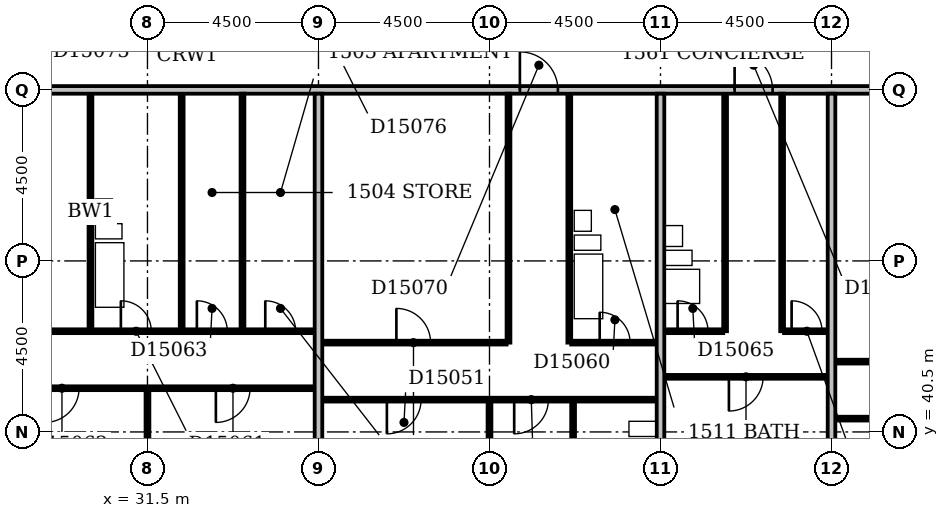
"""IFC4 building model, lengths in metres.
Left out: names, types, materials, properties, quantities, classifications, styles, units other than length and angle.
Written with IfcOpenShell. Run it as: python <this file> out.ifc"""

import sys

from ifc_helpers import new_model, si_unit, direction, frame, frame_2d, origin, place, context, subcontext, project, spatial, rectangle, extrude, element, fill, save


model = new_model("IFC4")
c1 = context("Model", 3, precision=1e-05, world=origin(), true_north=direction((0.0, 1.0)))
c2 = subcontext(c1, "Body", "Model", "MODEL_VIEW")
j1 = project(units=[si_unit("LENGTHUNIT", "METRE"), si_unit("PLANEANGLEUNIT", "RADIAN")], contexts=[c1])
p1 = place(None, origin())
s1 = spatial("IfcSite", under=j1, at=p1, CompositionType="ELEMENT")
p2 = place(p1, origin())
s2 = spatial("IfcBuilding", under=s1, at=p2, CompositionType="ELEMENT")
p3 = place(p2, frame((0.0, 0.0, 65.0)))
s3 = spatial("IfcBuildingStorey", under=s2, at=p3, CompositionType="ELEMENT", Elevation=65.0)
p4 = place(p3, frame((31.5, 36.6, 0.0), z_axis=(0.0, 0.0, 1.0), x_axis=(0.0, 1.0, 0.0)))
e1 = element("IfcWall", 1, at=p4, inside=s3, PredefinedType="PARTITIONING", context=c2, shape_type="SweptSolid", body=[
    extrude(rectangle(XDim=5.0, YDim=0.1, at=frame_2d((2.5, 0.0))), origin(), (0.0, 0.0, 1.0), 3.3),
])
p5 = place(p3, frame((36.0, 36.6, 0.0), z_axis=(0.0, 0.0, 1.0), x_axis=(0.0, 1.0, 0.0)))
e2 = element("IfcWall", 2, at=p5, inside=s3, PredefinedType="PARTITIONING", context=c2, shape_type="SweptSolid", body=[
    extrude(rectangle(XDim=12.8, YDim=0.2, at=frame_2d((6.4, 0.0))), origin(), (0.0, 0.0, 1.0), 2.4),
])
p6 = place(p3, frame((40.5, 36.6, 0.0), z_axis=(0.0, 0.0, 1.0), x_axis=(0.0, 1.0, 0.0)))
e3 = element("IfcWall", 3, at=p6, inside=s3, PredefinedType="PARTITIONING", context=c2, shape_type="SweptSolid", body=[
    extrude(rectangle(XDim=4.7, YDim=0.1, at=frame_2d((2.35, 0.0))), origin(), (0.0, 0.0, 1.0), 3.3),
])
p7 = place(p3, frame((45.0, 36.6, 0.0), z_axis=(0.0, 0.0, 1.0), x_axis=(0.0, 1.0, 0.0)))
e4 = element("IfcWall", 4, at=p7, inside=s3, PredefinedType="PARTITIONING", context=c2, shape_type="SweptSolid", body=[
    extrude(rectangle(XDim=12.8, YDim=0.2, at=frame_2d((6.4, 0.0))), origin(), (0.0, 0.0, 1.0), 2.6),
])
p8 = place(p3, frame((49.5, 36.6, 0.0), z_axis=(0.0, 0.0, 1.0), x_axis=(0.0, 1.0, 0.0)))
e5 = element("IfcWall", 5, at=p8, inside=s3, PredefinedType="PARTITIONING", context=c2, shape_type="SweptSolid", body=[
    extrude(rectangle(XDim=12.8, YDim=0.2, at=frame_2d((6.4, 0.0))), origin(), (0.0, 0.0, 1.0), 3.3),
])
p9 = place(p3, frame((42.7, 38.45, 0.0), z_axis=(0.0, 0.0, 1.0), x_axis=(0.0, 1.0, 0.0)))
e6 = element("IfcWall", 6, at=p9, inside=s3, PredefinedType="PLUMBINGWALL", context=c2, shape_type="SweptSolid", body=[
    extrude(rectangle(XDim=2.85, YDim=0.1, at=frame_2d((1.425, 0.0))), origin(), (0.0, 0.0, 1.0), 3.3),
])
p10 = place(p9, frame((1.05, 0.0, 0.0)))
e7 = element("IfcOpeningElement", 7, at=p10, cuts=e6, PredefinedType="OPENING", context=c2, shape_type="SweptSolid", body=[
    extrude(rectangle(XDim=0.8, YDim=2.1, at=frame_2d((0.4, 1.05))), frame((0.0, 0.062, 0.0), z_axis=(0.0, -1.0, 0.0), x_axis=(1.0, 0.0, 0.0)), (0.0, 0.0, 1.0), 0.124),
])
p11 = place(p3, frame((49.6, 40.85, 0.0), z_axis=(0.0, 0.0, 1.0), x_axis=(1.0, 0.0, 0.0)))
e8 = element("IfcWall", 8, at=p11, inside=s3, PredefinedType="PARTITIONING", context=c2, shape_type="SweptSolid", body=[
    extrude(rectangle(XDim=8.8, YDim=0.1, at=frame_2d((4.4, 0.0))), origin(), (0.0, 0.0, 1.0), 3.3),
])
p12 = place(p11, frame((1.7, 0.0, 0.0)))
e9 = element("IfcOpeningElement", 9, at=p12, cuts=e8, PredefinedType="OPENING", context=c2, shape_type="SweptSolid", body=[
    extrude(rectangle(XDim=0.9, YDim=2.1, at=frame_2d((0.45, 1.05))), frame((0.0, 0.062, 0.0), z_axis=(0.0, -1.0, 0.0), x_axis=(1.0, 0.0, 0.0)), (0.0, 0.0, 1.0), 0.124),
])
p13 = place(p11, frame((5.05, 0.0, 0.0)))
e10 = element("IfcOpeningElement", 10, at=p13, cuts=e8, PredefinedType="OPENING", context=c2, shape_type="SweptSolid", body=[
    extrude(rectangle(XDim=0.9, YDim=2.1, at=frame_2d((0.45, 1.05))), frame((0.0, 0.062, 0.0), z_axis=(0.0, -1.0, 0.0), x_axis=(1.0, 0.0, 0.0)), (0.0, 0.0, 1.0), 0.124),
])
p14 = place(p3, frame((36.1, 41.35, 0.0), z_axis=(0.0, 0.0, 1.0), x_axis=(1.0, 0.0, 0.0)))
e11 = element("IfcWall", 11, at=p14, inside=s3, PredefinedType="PARTITIONING", context=c2, shape_type="SweptSolid", body=[
    extrude(rectangle(XDim=8.8, YDim=0.1, at=frame_2d((4.4, 0.0))), origin(), (0.0, 0.0, 1.0), 3.3),
])
p15 = place(p14, frame((1.7, 0.0, 0.0)))
e12 = element("IfcOpeningElement", 12, at=p15, cuts=e11, PredefinedType="OPENING", context=c2, shape_type="SweptSolid", body=[
    extrude(rectangle(XDim=0.9, YDim=2.1, at=frame_2d((0.45, 1.05))), frame((0.0, 0.062, 0.0), z_axis=(0.0, -1.0, 0.0), x_axis=(1.0, 0.0, 0.0)), (0.0, 0.0, 1.0), 0.124),
])
p16 = place(p14, frame((5.05, 0.0, 0.0)))
e13 = element("IfcOpeningElement", 13, at=p16, cuts=e11, PredefinedType="OPENING", context=c2, shape_type="SweptSolid", body=[
    extrude(rectangle(XDim=0.9, YDim=2.1, at=frame_2d((0.45, 1.05))), frame((0.0, 0.062, 0.0), z_axis=(0.0, -1.0, 0.0), x_axis=(1.0, 0.0, 0.0)), (0.0, 0.0, 1.0), 0.124),
])
p17 = place(p3, frame((22.6, 41.65, 0.0), z_axis=(0.0, 0.0, 1.0), x_axis=(1.0, 0.0, 0.0)))
e14 = element("IfcWall", 14, at=p17, inside=s3, PredefinedType="PARTITIONING", context=c2, shape_type="SweptSolid", body=[
    extrude(rectangle(XDim=13.3, YDim=0.1, at=frame_2d((6.65, 0.0))), origin(), (0.0, 0.0, 1.0), 3.3),
])
p18 = place(p17, frame((1.7, 0.0, 0.0)))
e15 = element("IfcOpeningElement", 15, at=p18, cuts=e14, PredefinedType="OPENING", context=c2, shape_type="SweptSolid", body=[
    extrude(rectangle(XDim=0.9, YDim=2.1, at=frame_2d((0.45, 1.05))), frame((0.0, 0.062, 0.0), z_axis=(0.0, -1.0, 0.0), x_axis=(1.0, 0.0, 0.0)), (0.0, 0.0, 1.0), 0.124),
])
p19 = place(p17, frame((6.2, 0.0, 0.0)))
e16 = element("IfcOpeningElement", 16, at=p19, cuts=e14, PredefinedType="OPENING", context=c2, shape_type="SweptSolid", body=[
    extrude(rectangle(XDim=0.9, YDim=2.1, at=frame_2d((0.45, 1.05))), frame((0.0, 0.062, 0.0), z_axis=(0.0, -1.0, 0.0), x_axis=(1.0, 0.0, 0.0)), (0.0, 0.0, 1.0), 0.124),
])
p20 = place(p17, frame((10.7, 0.0, 0.0)))
e17 = element("IfcOpeningElement", 17, at=p20, cuts=e14, PredefinedType="OPENING", context=c2, shape_type="SweptSolid", body=[
    extrude(rectangle(XDim=0.9, YDim=2.1, at=frame_2d((0.45, 1.05))), frame((0.0, 0.062, 0.0), z_axis=(0.0, -1.0, 0.0), x_axis=(1.0, 0.0, 0.0)), (0.0, 0.0, 1.0), 0.124),
])
p21 = place(p3, frame((45.1, 41.95, 0.0), z_axis=(0.0, 0.0, 1.0), x_axis=(1.0, 0.0, 0.0)))
e18 = element("IfcWall", 18, at=p21, inside=s3, PredefinedType="PARTITIONING", context=c2, shape_type="SweptSolid", body=[
    extrude(rectangle(XDim=4.3, YDim=0.1, at=frame_2d((2.15, 0.0))), origin(), (0.0, 0.0, 1.0), 3.3),
])
p22 = place(p21, frame((1.7, 0.0, 0.0)))
e19 = element("IfcOpeningElement", 19, at=p22, cuts=e18, PredefinedType="OPENING", context=c2, shape_type="SweptSolid", body=[
    extrude(rectangle(XDim=0.9, YDim=2.1, at=frame_2d((0.45, 1.05))), frame((0.0, 0.062, 0.0), z_axis=(0.0, -1.0, 0.0), x_axis=(1.0, 0.0, 0.0)), (0.0, 0.0, 1.0), 0.124),
])
p23 = place(p3, frame((49.6, 42.35, 0.0), z_axis=(0.0, 0.0, 1.0), x_axis=(1.0, 0.0, 0.0)))
e20 = element("IfcWall", 20, at=p23, inside=s3, PredefinedType="PARTITIONING", context=c2, shape_type="SweptSolid", body=[
    extrude(rectangle(XDim=4.85, YDim=0.1, at=frame_2d((2.425, 0.0))), origin(), (0.0, 0.0, 1.0), 3.3),
])
p24 = place(p23, frame((1.95, 0.0, 0.0)))
e21 = element("IfcOpeningElement", 21, at=p24, cuts=e20, PredefinedType="OPENING", context=c2, shape_type="SweptSolid", body=[
    extrude(rectangle(XDim=0.9, YDim=2.1, at=frame_2d((0.45, 1.05))), frame((0.0, 0.062, 0.0), z_axis=(0.0, -1.0, 0.0), x_axis=(1.0, 0.0, 0.0)), (0.0, 0.0, 1.0), 0.124),
])
p25 = place(p3, frame((36.1, 42.85, 0.0), z_axis=(0.0, 0.0, 1.0), x_axis=(1.0, 0.0, 0.0)))
e22 = element("IfcWall", 22, at=p25, inside=s3, PredefinedType="PARTITIONING", context=c2, shape_type="SweptSolid", body=[
    extrude(rectangle(XDim=4.85, YDim=0.1, at=frame_2d((2.425, 0.0))), origin(), (0.0, 0.0, 1.0), 3.3),
])
p26 = place(p25, frame((1.95, 0.0, 0.0)))
e23 = element("IfcOpeningElement", 23, at=p26, cuts=e22, PredefinedType="OPENING", context=c2, shape_type="SweptSolid", body=[
    extrude(rectangle(XDim=0.9, YDim=2.1, at=frame_2d((0.45, 1.05))), frame((0.0, 0.062, 0.0), z_axis=(0.0, -1.0, 0.0), x_axis=(1.0, 0.0, 0.0)), (0.0, 0.0, 1.0), 0.124),
])
p27 = place(p3, frame((41.0, 42.85, 0.0), z_axis=(0.0, 0.0, 1.0), x_axis=(0.0, 1.0, 0.0)))
e24 = element("IfcWall", 24, at=p27, inside=s3, PredefinedType="PARTITIONING", context=c2, shape_type="SweptSolid", body=[
    extrude(rectangle(XDim=6.55, YDim=0.1, at=frame_2d((3.275, 0.0))), origin(), (0.0, 0.0, 1.0), 3.3),
])
p28 = place(p3, frame((42.6, 42.85, 0.0), z_axis=(0.0, 0.0, 1.0), x_axis=(0.0, 1.0, 0.0)))
e25 = element("IfcWall", 25, at=p28, inside=s3, PredefinedType="PLUMBINGWALL", context=c2, shape_type="SweptSolid", body=[
    extrude(rectangle(XDim=6.55, YDim=0.1, at=frame_2d((3.275, 0.0))), origin(), (0.0, 0.0, 1.0), 3.3),
])
p29 = place(p3, frame((42.65, 42.85, 0.0), z_axis=(0.0, 0.0, 1.0), x_axis=(1.0, 0.0, 0.0)))
e26 = element("IfcWall", 26, at=p29, inside=s3, PredefinedType="PARTITIONING", context=c2, shape_type="SweptSolid", body=[
    extrude(rectangle(XDim=2.25, YDim=0.1, at=frame_2d((1.125, 0.0))), origin(), (0.0, 0.0, 1.0), 3.3),
])
p30 = place(p29, frame((0.75, 0.0, 0.0)))
e27 = element("IfcOpeningElement", 27, at=p30, cuts=e26, PredefinedType="OPENING", context=c2, shape_type="SweptSolid", body=[
    extrude(rectangle(XDim=0.8, YDim=2.1, at=frame_2d((0.4, 1.05))), frame((0.0, 0.062, 0.0), z_axis=(0.0, -1.0, 0.0), x_axis=(1.0, 0.0, 0.0)), (0.0, 0.0, 1.0), 0.124),
])
p31 = place(p3, frame((24.15, 43.15, 0.0), z_axis=(0.0, 0.0, 1.0), x_axis=(1.0, 0.0, 0.0)))
e28 = element("IfcWall", 28, at=p31, inside=s3, PredefinedType="PARTITIONING", context=c2, shape_type="SweptSolid", body=[
    extrude(rectangle(XDim=11.75, YDim=0.1, at=frame_2d((5.875, 0.0))), origin(), (0.0, 0.0, 1.0), 3.3),
])
p32 = place(p31, frame((6.65, 0.0, 0.0)))
e29 = element("IfcOpeningElement", 29, at=p32, cuts=e28, PredefinedType="OPENING", context=c2, shape_type="SweptSolid", body=[
    extrude(rectangle(XDim=0.8, YDim=2.1, at=frame_2d((0.4, 1.05))), frame((0.0, 0.062, 0.0), z_axis=(0.0, -1.0, 0.0), x_axis=(1.0, 0.0, 0.0)), (0.0, 0.0, 1.0), 0.124),
])
p33 = place(p31, frame((2.45, 0.0, 0.0)))
e30 = element("IfcOpeningElement", 30, at=p33, cuts=e28, PredefinedType="OPENING", context=c2, shape_type="SweptSolid", body=[
    extrude(rectangle(XDim=0.9, YDim=2.1, at=frame_2d((0.45, 1.05))), frame((0.0, 0.062, 0.0), z_axis=(0.0, -1.0, 0.0), x_axis=(1.0, 0.0, 0.0)), (0.0, 0.0, 1.0), 0.124),
])
p34 = place(p31, frame((8.65, 0.0, 0.0)))
e31 = element("IfcOpeningElement", 31, at=p34, cuts=e28, PredefinedType="OPENING", context=c2, shape_type="SweptSolid", body=[
    extrude(rectangle(XDim=0.8, YDim=2.1, at=frame_2d((0.4, 1.05))), frame((0.0, 0.062, 0.0), z_axis=(0.0, -1.0, 0.0), x_axis=(1.0, 0.0, 0.0)), (0.0, 0.0, 1.0), 0.124),
])
p35 = place(p31, frame((10.45, 0.0, 0.0)))
e32 = element("IfcOpeningElement", 32, at=p35, cuts=e28, PredefinedType="OPENING", context=c2, shape_type="SweptSolid", body=[
    extrude(rectangle(XDim=0.8, YDim=2.1, at=frame_2d((0.4, 1.05))), frame((0.0, 0.062, 0.0), z_axis=(0.0, -1.0, 0.0), x_axis=(1.0, 0.0, 0.0)), (0.0, 0.0, 1.0), 0.124),
])
p36 = place(p3, frame((45.1, 43.15, 0.0), z_axis=(0.0, 0.0, 1.0), x_axis=(1.0, 0.0, 0.0)))
e33 = element("IfcWall", 33, at=p36, inside=s3, PredefinedType="PARTITIONING", context=c2, shape_type="SweptSolid", body=[
    extrude(rectangle(XDim=1.55, YDim=0.1, at=frame_2d((0.775, 0.0))), origin(), (0.0, 0.0, 1.0), 3.3),
])
p37 = place(p36, frame((0.35, 0.0, 0.0)))
e34 = element("IfcOpeningElement", 34, at=p37, cuts=e33, PredefinedType="OPENING", context=c2, shape_type="SweptSolid", body=[
    extrude(rectangle(XDim=0.8, YDim=2.1, at=frame_2d((0.4, 1.05))), frame((0.0, 0.062, 0.0), z_axis=(0.0, -1.0, 0.0), x_axis=(1.0, 0.0, 0.0)), (0.0, 0.0, 1.0), 0.124),
])
p38 = place(p3, frame((46.7, 43.15, 0.0), z_axis=(0.0, 0.0, 1.0), x_axis=(0.0, 1.0, 0.0)))
e35 = element("IfcWall", 35, at=p38, inside=s3, PredefinedType="PLUMBINGWALL", context=c2, shape_type="SweptSolid", body=[
    extrude(rectangle(XDim=6.25, YDim=0.1, at=frame_2d((3.125, 0.0))), origin(), (0.0, 0.0, 1.0), 3.3),
])
p39 = place(p3, frame((48.2, 43.15, 0.0), z_axis=(0.0, 0.0, 1.0), x_axis=(0.0, 1.0, 0.0)))
e36 = element("IfcWall", 36, at=p39, inside=s3, PredefinedType="PARTITIONING", context=c2, shape_type="SweptSolid", body=[
    extrude(rectangle(XDim=6.25, YDim=0.1, at=frame_2d((3.125, 0.0))), origin(), (0.0, 0.0, 1.0), 3.3),
])
p40 = place(p3, frame((48.25, 43.15, 0.0), z_axis=(0.0, 0.0, 1.0), x_axis=(1.0, 0.0, 0.0)))
e37 = element("IfcWall", 37, at=p40, inside=s3, PredefinedType="PARTITIONING", context=c2, shape_type="SweptSolid", body=[
    extrude(rectangle(XDim=1.15, YDim=0.1, at=frame_2d((0.575, 0.0))), origin(), (0.0, 0.0, 1.0), 3.3),
])
p41 = place(p40, frame((0.2, 0.0, 0.0)))
e38 = element("IfcOpeningElement", 38, at=p41, cuts=e37, PredefinedType="OPENING", context=c2, shape_type="SweptSolid", body=[
    extrude(rectangle(XDim=0.8, YDim=2.1, at=frame_2d((0.4, 1.05))), frame((0.0, 0.062, 0.0), z_axis=(0.0, -1.0, 0.0), x_axis=(1.0, 0.0, 0.0)), (0.0, 0.0, 1.0), 0.124),
])
for number, where, z_axis, x_axis in (
    (39, (30.0, 43.2, 0.0), (0.0, 0.0, 1.0), (0.0, 1.0, 0.0)),
    (40, (32.4, 43.2, 0.0), (0.0, 0.0, 1.0), (0.0, 1.0, 0.0)),
):
    element("IfcWall", number, at=place(p3, frame(where, z_axis=z_axis, x_axis=x_axis)), inside=s3, PredefinedType="PLUMBINGWALL", context=c2, shape_type="SweptSolid", body=[
        extrude(rectangle(XDim=6.2, YDim=0.1, at=frame_2d((3.1, 0.0))), origin(), (0.0, 0.0, 1.0), 3.3),
    ])
p42 = place(p3, frame((34.0, 43.2, 0.0), z_axis=(0.0, 0.0, 1.0), x_axis=(0.0, 1.0, 0.0)))
e41 = element("IfcWall", 41, at=p42, inside=s3, PredefinedType="PARTITIONING", context=c2, shape_type="SweptSolid", body=[
    extrude(rectangle(XDim=6.2, YDim=0.1, at=frame_2d((3.1, 0.0))), origin(), (0.0, 0.0, 1.0), 3.3),
])
p43 = place(p3, frame((9.1, 49.5, 0.0), z_axis=(0.0, 0.0, 1.0), x_axis=(1.0, 0.0, 0.0)))
e42 = element("IfcWall", 42, at=p43, inside=s3, PredefinedType="PARTITIONING", context=c2, shape_type="SweptSolid", body=[
    extrude(rectangle(XDim=57.8, YDim=0.2, at=frame_2d((28.9, 0.0))), origin(), (0.0, 0.0, 1.0), 3.3),
])
p44 = place(p43, frame((13.7, 0.0, 0.0)))
e43 = element("IfcOpeningElement", 43, at=p44, cuts=e42, PredefinedType="OPENING", context=c2, shape_type="SweptSolid", body=[
    extrude(rectangle(XDim=1.0, YDim=2.1, at=frame_2d((0.5, 1.05))), frame((0.0, 0.112, 0.0), z_axis=(0.0, -1.0, 0.0), x_axis=(1.0, 0.0, 0.0)), (0.0, 0.0, 1.0), 0.224),
])
p45 = place(p43, frame((32.2, 0.0, 0.0)))
e44 = element("IfcOpeningElement", 44, at=p45, cuts=e42, PredefinedType="OPENING", context=c2, shape_type="SweptSolid", body=[
    extrude(rectangle(XDim=1.0, YDim=2.1, at=frame_2d((0.5, 1.05))), frame((0.0, 0.112, 0.0), z_axis=(0.0, -1.0, 0.0), x_axis=(1.0, 0.0, 0.0)), (0.0, 0.0, 1.0), 0.224),
])
p46 = place(p43, frame((37.85, 0.0, 0.0)))
e45 = element("IfcOpeningElement", 45, at=p46, cuts=e42, PredefinedType="OPENING", context=c2, shape_type="SweptSolid", body=[
    extrude(rectangle(XDim=1.0, YDim=2.1, at=frame_2d((0.5, 1.05))), frame((0.0, 0.112, 0.0), z_axis=(0.0, -1.0, 0.0), x_axis=(1.0, 0.0, 0.0)), (0.0, 0.0, 1.0), 0.224),
])
p47 = place(p43, frame((45.7, 0.0, 0.0)))
e46 = element("IfcOpeningElement", 46, at=p47, cuts=e42, PredefinedType="OPENING", context=c2, shape_type="SweptSolid", body=[
    extrude(rectangle(XDim=1.0, YDim=2.1, at=frame_2d((0.5, 1.05))), frame((0.0, 0.112, 0.0), z_axis=(0.0, -1.0, 0.0), x_axis=(1.0, 0.0, 0.0)), (0.0, 0.0, 1.0), 0.224),
])
p48 = place(p43, frame((49.7, 0.0, 0.0)))
e47 = element("IfcOpeningElement", 47, at=p48, cuts=e42, PredefinedType="OPENING", context=c2, shape_type="SweptSolid", body=[
    extrude(rectangle(XDim=1.0, YDim=2.1, at=frame_2d((0.5, 1.05))), frame((0.0, 0.112, 0.0), z_axis=(0.0, -1.0, 0.0), x_axis=(1.0, 0.0, 0.0)), (0.0, 0.0, 1.0), 0.224),
])
p49 = place(p43, frame((8.4, 0.0, 0.0)))
e48 = element("IfcOpeningElement", 48, at=p49, cuts=e42, PredefinedType="OPENING", context=c2, shape_type="SweptSolid", body=[
    extrude(rectangle(XDim=0.9, YDim=2.1, at=frame_2d((0.45, 1.05))), frame((0.0, 0.112, 0.0), z_axis=(0.0, -1.0, 0.0), x_axis=(1.0, 0.0, 0.0)), (0.0, 0.0, 1.0), 0.224),
])
p50 = place(p15, frame((0.9, 0.0, 0.0), z_axis=(0.0, 0.0, 1.0), x_axis=(-1.0, 0.0, 0.0)))
e49 = element("IfcDoor", 49, at=p50, inside=s3, OperationType="SINGLE_SWING_RIGHT", PredefinedType="DOOR", context=c2, shape_type="SweptSolid", body=[
    extrude(rectangle(XDim=0.9, YDim=2.1, at=frame_2d((0.45, 1.05))), frame((0.0, 0.025, 0.0), z_axis=(0.0, -1.0, 0.0), x_axis=(1.0, 0.0, 0.0)), (0.0, 0.0, 1.0), 0.05),
])
fill(e12, e49)
p51 = place(p16, frame((0.9, 0.0, 0.0), z_axis=(0.0, 0.0, 1.0), x_axis=(-1.0, 0.0, 0.0)))
e50 = element("IfcDoor", 50, at=p51, inside=s3, OperationType="SINGLE_SWING_RIGHT", PredefinedType="DOOR", context=c2, shape_type="SweptSolid", body=[
    extrude(rectangle(XDim=0.9, YDim=2.1, at=frame_2d((0.45, 1.05))), frame((0.0, 0.025, 0.0), z_axis=(0.0, -1.0, 0.0), x_axis=(1.0, 0.0, 0.0)), (0.0, 0.0, 1.0), 0.05),
])
fill(e13, e50)
p52 = place(p19, frame((0.9, 0.0, 0.0), z_axis=(0.0, 0.0, 1.0), x_axis=(-1.0, 0.0, 0.0)))
e51 = element("IfcDoor", 51, at=p52, inside=s3, OperationType="SINGLE_SWING_RIGHT", PredefinedType="DOOR", context=c2, shape_type="SweptSolid", body=[
    extrude(rectangle(XDim=0.9, YDim=2.1, at=frame_2d((0.45, 1.05))), frame((0.0, 0.025, 0.0), z_axis=(0.0, -1.0, 0.0), x_axis=(1.0, 0.0, 0.0)), (0.0, 0.0, 1.0), 0.05),
])
fill(e16, e51)
p53 = place(p20, frame((0.9, 0.0, 0.0), z_axis=(0.0, 0.0, 1.0), x_axis=(-1.0, 0.0, 0.0)))
e52 = element("IfcDoor", 52, at=p53, inside=s3, OperationType="SINGLE_SWING_RIGHT", PredefinedType="DOOR", context=c2, shape_type="SweptSolid", body=[
    extrude(rectangle(XDim=0.9, YDim=2.1, at=frame_2d((0.45, 1.05))), frame((0.0, 0.025, 0.0), z_axis=(0.0, -1.0, 0.0), x_axis=(1.0, 0.0, 0.0)), (0.0, 0.0, 1.0), 0.05),
])
fill(e17, e52)
p54 = place(p22, frame((0.9, 0.0, 0.0), z_axis=(0.0, 0.0, 1.0), x_axis=(-1.0, 0.0, 0.0)))
e53 = element("IfcDoor", 53, at=p54, inside=s3, OperationType="SINGLE_SWING_RIGHT", PredefinedType="DOOR", context=c2, shape_type="SweptSolid", body=[
    extrude(rectangle(XDim=0.9, YDim=2.1, at=frame_2d((0.45, 1.05))), frame((0.0, 0.025, 0.0), z_axis=(0.0, -1.0, 0.0), x_axis=(1.0, 0.0, 0.0)), (0.0, 0.0, 1.0), 0.05),
])
fill(e19, e53)
p55 = place(p26, origin())
e54 = element("IfcDoor", 54, at=p55, inside=s3, OperationType="SINGLE_SWING_LEFT", PredefinedType="DOOR", context=c2, shape_type="SweptSolid", body=[
    extrude(rectangle(XDim=0.9, YDim=2.1, at=frame_2d((0.45, 1.05))), frame((0.0, 0.025, 0.0), z_axis=(0.0, -1.0, 0.0), x_axis=(1.0, 0.0, 0.0)), (0.0, 0.0, 1.0), 0.05),
])
fill(e23, e54)
p56 = place(p30, origin())
e55 = element("IfcDoor", 55, at=p56, inside=s3, OperationType="SINGLE_SWING_LEFT", PredefinedType="DOOR", context=c2, shape_type="SweptSolid", body=[
    extrude(rectangle(XDim=0.8, YDim=2.1, at=frame_2d((0.4, 1.05))), frame((0.0, 0.025, 0.0), z_axis=(0.0, -1.0, 0.0), x_axis=(1.0, 0.0, 0.0)), (0.0, 0.0, 1.0), 0.05),
])
fill(e27, e55)
p57 = place(p32, origin())
e56 = element("IfcDoor", 56, at=p57, inside=s3, OperationType="SINGLE_SWING_LEFT", PredefinedType="DOOR", context=c2, shape_type="SweptSolid", body=[
    extrude(rectangle(XDim=0.8, YDim=2.1, at=frame_2d((0.4, 1.05))), frame((0.0, 0.025, 0.0), z_axis=(0.0, -1.0, 0.0), x_axis=(1.0, 0.0, 0.0)), (0.0, 0.0, 1.0), 0.05),
])
fill(e29, e56)
p58 = place(p34, origin())
e57 = element("IfcDoor", 57, at=p58, inside=s3, OperationType="SINGLE_SWING_LEFT", PredefinedType="DOOR", context=c2, shape_type="SweptSolid", body=[
    extrude(rectangle(XDim=0.8, YDim=2.1, at=frame_2d((0.4, 1.05))), frame((0.0, 0.025, 0.0), z_axis=(0.0, -1.0, 0.0), x_axis=(1.0, 0.0, 0.0)), (0.0, 0.0, 1.0), 0.05),
])
fill(e31, e57)
p59 = place(p35, origin())
e58 = element("IfcDoor", 58, at=p59, inside=s3, OperationType="SINGLE_SWING_LEFT", PredefinedType="DOOR", context=c2, shape_type="SweptSolid", body=[
    extrude(rectangle(XDim=0.8, YDim=2.1, at=frame_2d((0.4, 1.05))), frame((0.0, 0.025, 0.0), z_axis=(0.0, -1.0, 0.0), x_axis=(1.0, 0.0, 0.0)), (0.0, 0.0, 1.0), 0.05),
])
fill(e32, e58)
p60 = place(p37, origin())
e59 = element("IfcDoor", 59, at=p60, inside=s3, OperationType="SINGLE_SWING_LEFT", PredefinedType="DOOR", context=c2, shape_type="SweptSolid", body=[
    extrude(rectangle(XDim=0.8, YDim=2.1, at=frame_2d((0.4, 1.05))), frame((0.0, 0.025, 0.0), z_axis=(0.0, -1.0, 0.0), x_axis=(1.0, 0.0, 0.0)), (0.0, 0.0, 1.0), 0.05),
])
fill(e34, e59)
p61 = place(p41, origin())
e60 = element("IfcDoor", 60, at=p61, inside=s3, OperationType="SINGLE_SWING_LEFT", PredefinedType="DOOR", context=c2, shape_type="SweptSolid", body=[
    extrude(rectangle(XDim=0.8, YDim=2.1, at=frame_2d((0.4, 1.05))), frame((0.0, 0.025, 0.0), z_axis=(0.0, -1.0, 0.0), x_axis=(1.0, 0.0, 0.0)), (0.0, 0.0, 1.0), 0.05),
])
fill(e38, e60)
p62 = place(p45, origin())
e61 = element("IfcDoor", 61, at=p62, inside=s3, OperationType="SINGLE_SWING_LEFT", PredefinedType="DOOR", context=c2, shape_type="SweptSolid", body=[
    extrude(rectangle(XDim=1.0, YDim=2.1, at=frame_2d((0.5, 1.05))), frame((0.0, 0.025, 0.0), z_axis=(0.0, -1.0, 0.0), x_axis=(1.0, 0.0, 0.0)), (0.0, 0.0, 1.0), 0.05),
])
fill(e44, e61)
p63 = place(p46, origin())
e62 = element("IfcDoor", 62, at=p63, inside=s3, OperationType="SINGLE_SWING_LEFT", PredefinedType="DOOR", context=c2, shape_type="SweptSolid", body=[
    extrude(rectangle(XDim=1.0, YDim=2.1, at=frame_2d((0.5, 1.05))), frame((0.0, 0.025, 0.0), z_axis=(0.0, -1.0, 0.0), x_axis=(1.0, 0.0, 0.0)), (0.0, 0.0, 1.0), 0.05),
])
fill(e45, e62)
save(model, sys.argv[1])
